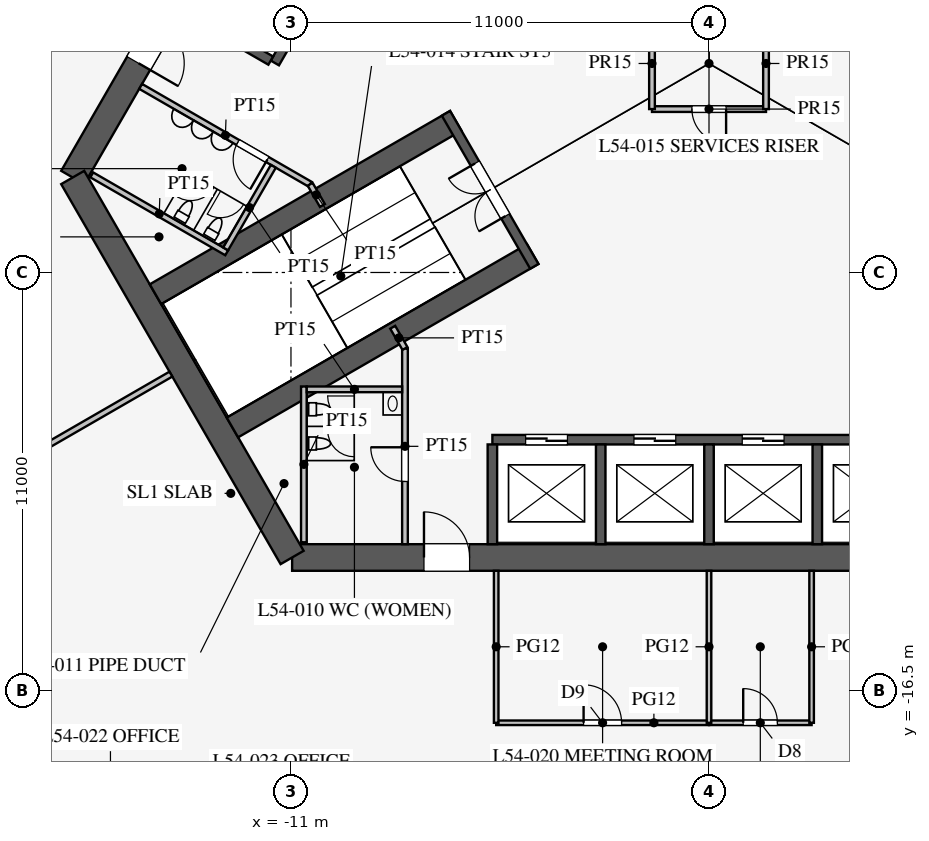
"""IFC4 building model, lengths in metres.
Left out: names, types, materials, properties, quantities, classifications, styles, units other than length and angle.
Written with IfcOpenShell. Run it as: python <this file> out.ifc"""

import sys

from ifc_helpers import new_model, si_unit, direction, frame, frame_2d, origin, place, context, subcontext, project, spatial, rectangle, extrude, element, fill, save


model = new_model("IFC4")
c1 = context("Model", 3, precision=1e-05, world=origin(), true_north=direction((0.0, 1.0)))
c2 = subcontext(c1, "Body", "Model", "MODEL_VIEW")
j1 = project(units=[si_unit("LENGTHUNIT", "METRE"), si_unit("PLANEANGLEUNIT", "RADIAN")], contexts=[c1])
p1 = place(None, origin())
s1 = spatial("IfcSite", under=j1, at=p1, CompositionType="ELEMENT")
p2 = place(p1, origin())
s2 = spatial("IfcBuilding", under=s1, at=p2, CompositionType="ELEMENT")
p3 = place(p2, frame((0.0, 0.0, 235.9)))
s3 = spatial("IfcBuildingStorey", under=s2, at=p3, CompositionType="ELEMENT", Elevation=235.9)
p4 = place(p3, frame((-10.97, -13.0, 0.0), z_axis=(0.0, 0.0, 1.0), x_axis=(1.0, 0.0, 0.0)))
e1 = element("IfcWall", 1, at=p4, inside=s3, PredefinedType="SHEAR", context=c2, shape_type="SweptSolid", body=[
    extrude(rectangle(XDim=21.939, YDim=0.7, at=frame_2d((10.97, 0.0))), origin(), (0.0, 0.0, 1.0), 4.2),
])
p5 = place(p4, frame((17.27, 0.0, 0.0)))
e2 = element("IfcOpeningElement", 2, at=p5, cuts=e1, PredefinedType="OPENING", context=c2, shape_type="SweptSolid", body=[
    extrude(rectangle(XDim=1.2, YDim=2.1, at=frame_2d((0.6, 1.05))), frame((0.0, 0.36, 0.0), z_axis=(0.0, -1.0, 0.0), x_axis=(1.0, 0.0, 0.0)), (0.0, 0.0, 1.0), 0.72),
])
p6 = place(p4, frame((3.47, 0.0, 0.0)))
e3 = element("IfcOpeningElement", 3, at=p6, cuts=e1, PredefinedType="OPENING", context=c2, shape_type="SweptSolid", body=[
    extrude(rectangle(XDim=1.2, YDim=2.1, at=frame_2d((0.6, 1.05))), frame((0.0, 0.36, 0.0), z_axis=(0.0, -1.0, 0.0), x_axis=(1.0, 0.0, 0.0)), (0.0, 0.0, 1.0), 0.72),
])
p7 = place(p3, frame((-5.773, 16.0, 0.0), z_axis=(0.0, 0.0, 1.0), x_axis=(-0.500002442456, -0.866023993627, 0.0)))
e4 = element("IfcWall", 4, at=p7, inside=s3, PredefinedType="SHEAR", context=c2, shape_type="SweptSolid", body=[
    extrude(rectangle(XDim=21.939, YDim=0.7, at=frame_2d((10.97, 0.0))), origin(), (0.0, 0.0, 1.0), 4.2),
])
p8 = place(p7, frame((17.27, 0.0, 0.0)))
e5 = element("IfcOpeningElement", 5, at=p8, cuts=e4, PredefinedType="OPENING", context=c2, shape_type="SweptSolid", body=[
    extrude(rectangle(XDim=1.2, YDim=2.1, at=frame_2d((0.6, 1.05))), frame((0.0, 0.36, 0.0), z_axis=(0.0, -1.0, 0.0), x_axis=(1.0, 0.0, 0.0)), (0.0, 0.0, 1.0), 0.72),
])
p9 = place(p7, frame((3.47, 0.0, 0.0)))
e6 = element("IfcOpeningElement", 6, at=p9, cuts=e4, PredefinedType="OPENING", context=c2, shape_type="SweptSolid", body=[
    extrude(rectangle(XDim=1.2, YDim=2.1, at=frame_2d((0.6, 1.05))), frame((0.0, 0.36, 0.0), z_axis=(0.0, -1.0, 0.0), x_axis=(1.0, 0.0, 0.0)), (0.0, 0.0, 1.0), 0.72),
])
p10 = place(p3, frame((-16.743, -3.0, 0.0), z_axis=(0.0, 0.0, 1.0), x_axis=(0.499995765644, -0.866027848477, 0.0)))
e7 = element("IfcWall", 7, at=p10, inside=s3, PredefinedType="SHEAR", context=c2, shape_type="SweptSolid", body=[
    extrude(rectangle(XDim=11.547, YDim=0.7, at=frame_2d((5.773, 0.0))), origin(), (0.0, 0.0, 1.0), 4.2),
])
p11 = place(p3, frame((-5.7, -9.9, 0.0), z_axis=(0.0, 0.0, 1.0), x_axis=(1.0, 0.0, 0.0)))
e8 = element("IfcWall", 8, at=p11, inside=s3, PredefinedType="SHEAR", context=c2, shape_type="SweptSolid", body=[
    extrude(rectangle(XDim=11.4, YDim=0.25, at=frame_2d((5.7, 0.0))), origin(), (0.0, 0.0, 1.0), 4.2),
])
p12 = place(p11, frame((0.875, 0.0, 0.0)))
e9 = element("IfcOpeningElement", 9, at=p12, cuts=e8, PredefinedType="OPENING", context=c2, shape_type="SweptSolid", body=[
    extrude(rectangle(XDim=1.1, YDim=2.2, at=frame_2d((0.55, 1.1))), frame((0.0, 0.135, 0.0), z_axis=(0.0, -1.0, 0.0), x_axis=(1.0, 0.0, 0.0)), (0.0, 0.0, 1.0), 0.27),
])
p13 = place(p11, frame((3.725, 0.0, 0.0)))
e10 = element("IfcOpeningElement", 10, at=p13, cuts=e8, PredefinedType="OPENING", context=c2, shape_type="SweptSolid", body=[
    extrude(rectangle(XDim=1.1, YDim=2.2, at=frame_2d((0.55, 1.1))), frame((0.0, 0.135, 0.0), z_axis=(0.0, -1.0, 0.0), x_axis=(1.0, 0.0, 0.0)), (0.0, 0.0, 1.0), 0.27),
])
p14 = place(p11, frame((6.575, 0.0, 0.0)))
e11 = element("IfcOpeningElement", 11, at=p14, cuts=e8, PredefinedType="OPENING", context=c2, shape_type="SweptSolid", body=[
    extrude(rectangle(XDim=1.1, YDim=2.2, at=frame_2d((0.55, 1.1))), frame((0.0, 0.135, 0.0), z_axis=(0.0, -1.0, 0.0), x_axis=(1.0, 0.0, 0.0)), (0.0, 0.0, 1.0), 0.27),
])
p15 = place(p11, frame((9.425, 0.0, 0.0)))
e12 = element("IfcOpeningElement", 12, at=p15, cuts=e8, PredefinedType="OPENING", context=c2, shape_type="SweptSolid", body=[
    extrude(rectangle(XDim=1.1, YDim=2.2, at=frame_2d((0.55, 1.1))), frame((0.0, 0.135, 0.0), z_axis=(0.0, -1.0, 0.0), x_axis=(1.0, 0.0, 0.0)), (0.0, 0.0, 1.0), 0.27),
])
for number, where, z_axis, x_axis in (
    (13, (-5.7, -10.025, 0.0), (0.0, 0.0, 1.0), (0.0, -1.0, 0.0)),
    (14, (-2.85, -10.025, 0.0), (0.0, 0.0, 1.0), (0.0, -1.0, 0.0)),
    (15, (0.0, -10.025, 0.0), (0.0, 0.0, 1.0), (0.0, -1.0, 0.0)),
    (16, (2.85, -10.025, 0.0), (0.0, 0.0, 1.0), (0.0, -1.0, 0.0)),
):
    element("IfcWall", number, at=place(p3, frame(where, z_axis=z_axis, x_axis=x_axis)), inside=s3, PredefinedType="SHEAR", context=c2, shape_type="SweptSolid", body=[
        extrude(rectangle(XDim=2.625, YDim=0.25, at=frame_2d((1.312, 0.0))), origin(), (0.0, 0.0, 1.0), 4.2),
    ])
p16 = place(p3, frame((-5.724, 9.886, 0.0), z_axis=(0.0, 0.0, 1.0), x_axis=(-0.500001763848, -0.866024385424, 0.0)))
e17 = element("IfcWall", 17, at=p16, inside=s3, PredefinedType="SHEAR", context=c2, shape_type="SweptSolid", body=[
    extrude(rectangle(XDim=11.4, YDim=0.25, at=frame_2d((5.7, 0.0))), origin(), (0.0, 0.0, 1.0), 4.2),
])
p17 = place(p16, frame((6.525, 0.0, 0.0)))
e18 = element("IfcOpeningElement", 18, at=p17, cuts=e17, PredefinedType="OPENING", context=c2, shape_type="SweptSolid", body=[
    extrude(rectangle(XDim=1.2, YDim=2.2, at=frame_2d((0.6, 1.1))), frame((0.0, 0.135, 0.0), z_axis=(0.0, -1.0, 0.0), x_axis=(1.0, 0.0, 0.0)), (0.0, 0.0, 1.0), 0.27),
])
p18 = place(p16, frame((9.375, 0.0, 0.0)))
e19 = element("IfcOpeningElement", 19, at=p18, cuts=e17, PredefinedType="OPENING", context=c2, shape_type="SweptSolid", body=[
    extrude(rectangle(XDim=1.2, YDim=2.2, at=frame_2d((0.6, 1.1))), frame((0.0, 0.135, 0.0), z_axis=(0.0, -1.0, 0.0), x_axis=(1.0, 0.0, 0.0)), (0.0, 0.0, 1.0), 0.27),
])
p19 = place(p3, frame((-11.532, 0.076, 0.0), z_axis=(0.0, 0.0, 1.0), x_axis=(-0.866013657776, 0.500020344131, 0.0)))
e20 = element("IfcWall", 20, at=p19, inside=s3, PredefinedType="SHEAR", context=c2, shape_type="SweptSolid", body=[
    extrude(rectangle(XDim=2.625, YDim=0.25, at=frame_2d((1.312, 0.0))), origin(), (0.0, 0.0, 1.0), 4.2),
])
for number, where, z_axis, x_axis in (
    (21, (-6.663, -1.509, 0.0), (0.0, 0.0, 1.0), (-0.866, -0.5, 0.0)),
    (22, (-4.638, -5.016, 0.0), (0.0, 0.0, 1.0), (-0.866, -0.5, 0.0)),
):
    element("IfcWall", number, at=place(p3, frame(where, z_axis=z_axis, x_axis=x_axis)), inside=s3, PredefinedType="SHEAR", context=c2, shape_type="SweptSolid", body=[
        extrude(rectangle(XDim=9.125, YDim=0.6, at=frame_2d((4.562, 0.0))), origin(), (0.0, 0.0, 1.0), 4.2),
    ])
p20 = place(p3, frame((-6.922, -1.312, 0.0), z_axis=(0.0, 0.0, 1.0), x_axis=(0.499984536904, -0.866034331223, 0.0)))
e23 = element("IfcWall", 23, at=p20, inside=s3, PredefinedType="SHEAR", context=c2, shape_type="SweptSolid", body=[
    extrude(rectangle(XDim=4.65, YDim=0.25, at=frame_2d((2.325, 0.0))), origin(), (0.0, 0.0, 1.0), 4.2),
])
p21 = place(p20, frame((1.525, 0.0, 0.0)))
e24 = element("IfcOpeningElement", 24, at=p21, cuts=e23, PredefinedType="OPENING", context=c2, shape_type="SweptSolid", body=[
    extrude(rectangle(XDim=1.6, YDim=2.1, at=frame_2d((0.8, 1.05))), frame((0.0, 0.135, 0.0), z_axis=(0.0, -1.0, 0.0), x_axis=(1.0, 0.0, 0.0)), (0.0, 0.0, 1.0), 0.27),
])
p22 = place(p3, frame((-8.0, -7.5, 0.0), z_axis=(0.0, 0.0, 1.0), x_axis=(0.0, -1.0, 0.0)))
e25 = element("IfcWall", 25, at=p22, inside=s3, PredefinedType="PARTITIONING", context=c2, shape_type="SweptSolid", body=[
    extrude(rectangle(XDim=5.15, YDim=0.15, at=frame_2d((2.575, 0.0))), origin(), (0.0, 0.0, 1.0), 4.0),
])
p23 = place(p22, frame((2.6, 0.0, 0.0)))
e26 = element("IfcOpeningElement", 26, at=p23, cuts=e25, PredefinedType="OPENING", context=c2, shape_type="SweptSolid", body=[
    extrude(rectangle(XDim=0.9, YDim=2.1, at=frame_2d((0.45, 1.05))), frame((0.0, 0.085, 0.0), z_axis=(0.0, -1.0, 0.0), x_axis=(1.0, 0.0, 0.0)), (0.0, 0.0, 1.0), 0.17),
])
p24 = place(p3, frame((-10.495, -3.178, 0.0), z_axis=(0.0, 0.0, 1.0), x_axis=(-0.866037967349, 0.499978238636, 0.0)))
e27 = element("IfcWall", 27, at=p24, inside=s3, PredefinedType="PARTITIONING", context=c2, shape_type="SweptSolid", body=[
    extrude(rectangle(XDim=5.15, YDim=0.15, at=frame_2d((2.575, 0.0))), origin(), (0.0, 0.0, 1.0), 4.0),
])
p25 = place(p24, frame((1.3, 0.0, 0.0)))
e28 = element("IfcOpeningElement", 28, at=p25, cuts=e27, PredefinedType="OPENING", context=c2, shape_type="SweptSolid", body=[
    extrude(rectangle(XDim=0.9, YDim=2.1, at=frame_2d((0.45, 1.05))), frame((0.0, 0.085, 0.0), z_axis=(0.0, -1.0, 0.0), x_axis=(1.0, 0.0, 0.0)), (0.0, 0.0, 1.0), 0.17),
])
for number, where, z_axis, x_axis in (
    (29, (-10.495, -3.178, 0.0), (0.0, 0.0, 1.0), (0.5, -0.866, 0.0)),
    (30, (-8.0, -7.5, 0.0), (0.0, 0.0, 1.0), (-0.5, 0.866, 0.0)),
):
    element("IfcWall", number, at=place(p3, frame(where, z_axis=z_axis, x_axis=x_axis)), inside=s3, PredefinedType="PARTITIONING", context=c2, shape_type="SweptSolid", body=[
        extrude(rectangle(XDim=0.645, YDim=0.15, at=frame_2d((0.323, 0.0))), origin(), (0.0, 0.0, 1.0), 4.0),
    ])
p26 = place(p3, frame((-12.691, -4.982, 0.0), z_axis=(0.0, 0.0, 1.0), x_axis=(-0.8660249478, 0.500000789788, 0.0)))
e31 = element("IfcWall", 31, at=p26, inside=s3, PredefinedType="PARTITIONING", context=c2, shape_type="SweptSolid", body=[
    extrude(rectangle(XDim=4.1, YDim=0.15, at=frame_2d((2.05, 0.0))), origin(), (0.0, 0.0, 1.0), 4.0),
])
p27 = place(p3, frame((-11.464, -2.706, 0.0), z_axis=(0.0, 0.0, 1.0), x_axis=(-0.50001992892, -0.866013897511, 0.0)))
e32 = element("IfcWall", 32, at=p27, inside=s3, PredefinedType="PARTITIONING", context=c2, shape_type="SweptSolid", body=[
    extrude(rectangle(XDim=2.51, YDim=0.15, at=frame_2d((1.255, 0.0))), origin(), (0.0, 0.0, 1.0), 4.0),
])
p28 = place(p3, frame((-10.66, -8.5, 0.0), z_axis=(0.0, 0.0, 1.0), x_axis=(0.0, -1.0, 0.0)))
e33 = element("IfcWall", 33, at=p28, inside=s3, PredefinedType="PARTITIONING", context=c2, shape_type="SweptSolid", body=[
    extrude(rectangle(XDim=4.1, YDim=0.15, at=frame_2d((2.05, 0.0))), origin(), (0.0, 0.0, 1.0), 4.0),
])
p29 = place(p3, frame((-8.075, -8.575, 0.0), z_axis=(0.0, 0.0, 1.0), x_axis=(-1.0, 0.0, 0.0)))
e34 = element("IfcWall", 34, at=p29, inside=s3, PredefinedType="PARTITIONING", context=c2, shape_type="SweptSolid", body=[
    extrude(rectangle(XDim=2.51, YDim=0.15, at=frame_2d((1.255, 0.0))), origin(), (0.0, 0.0, 1.0), 4.0),
])
p30 = place(p3, frame((-1.5, -1.2, 0.0), z_axis=(0.0, 0.0, 1.0), x_axis=(1.0, 0.0, 0.0)))
e35 = element("IfcWall", 35, at=p30, inside=s3, PredefinedType="PARTITIONING", context=c2, shape_type="SweptSolid", body=[
    extrude(rectangle(XDim=3.0, YDim=0.15, at=frame_2d((1.5, 0.0))), origin(), (0.0, 0.0, 1.0), 4.0),
])
p31 = place(p30, frame((1.05, 0.0, 0.0)))
e36 = element("IfcOpeningElement", 36, at=p31, cuts=e35, PredefinedType="OPENING", context=c2, shape_type="SweptSolid", body=[
    extrude(rectangle(XDim=0.9, YDim=2.1, at=frame_2d((0.45, 1.05))), frame((0.0, 0.085, 0.0), z_axis=(0.0, -1.0, 0.0), x_axis=(1.0, 0.0, 0.0)), (0.0, 0.0, 1.0), 0.17),
])
for number, where, z_axis, x_axis in (
    (37, (1.5, -1.2, 0.0), (0.0, 0.0, 1.0), (0.0, 1.0, 0.0)),
    (38, (-1.5, 1.2, 0.0), (0.0, 0.0, 1.0), (0.0, -1.0, 0.0)),
):
    element("IfcWall", number, at=place(p3, frame(where, z_axis=z_axis, x_axis=x_axis)), inside=s3, PredefinedType="PARTITIONING", context=c2, shape_type="SweptSolid", body=[
        extrude(rectangle(XDim=2.4, YDim=0.15, at=frame_2d((1.2, 0.0))), origin(), (0.0, 0.0, 1.0), 4.0),
    ])
p32 = place(p3, frame((-14.159, -8.175, 0.0), z_axis=(0.0, 0.0, 1.0), x_axis=(-0.866027028085, -0.499997186618, 0.0)))
e39 = element("IfcWall", 39, at=p32, inside=s3, PredefinedType="PARTITIONING", context=c2, shape_type="SweptSolid", body=[
    extrude(rectangle(XDim=15.0, YDim=0.15, at=frame_2d((7.5, 0.0))), origin(), (0.0, 0.0, 1.0), 2.4),
])
p33 = place(p3, frame((0.0, -17.35, 0.0), z_axis=(0.0, 0.0, 1.0), x_axis=(1.0, 0.0, 0.0)))
e40 = element("IfcWall", 40, at=p33, inside=s3, PredefinedType="PARTITIONING", context=c2, shape_type="SweptSolid", body=[
    extrude(rectangle(XDim=2.7, YDim=0.12, at=frame_2d((1.35, 0.0))), origin(), (0.0, 0.0, 1.0), 2.9),
])
p34 = place(p33, frame((0.9, 0.0, 0.15)))
e41 = element("IfcOpeningElement", 41, at=p34, cuts=e40, PredefinedType="OPENING", context=c2, shape_type="SweptSolid", body=[
    extrude(rectangle(XDim=0.9, YDim=2.1, at=frame_2d((0.45, 1.05))), frame((0.0, 0.07, 0.0), z_axis=(0.0, -1.0, 0.0), x_axis=(1.0, 0.0, 0.0)), (0.0, 0.0, 1.0), 0.14),
])
p35 = place(p3, frame((-5.6, -17.35, 0.0), z_axis=(0.0, 0.0, 1.0), x_axis=(1.0, 0.0, 0.0)))
e42 = element("IfcWall", 42, at=p35, inside=s3, PredefinedType="PARTITIONING", context=c2, shape_type="SweptSolid", body=[
    extrude(rectangle(XDim=5.6, YDim=0.12, at=frame_2d((2.8, 0.0))), origin(), (0.0, 0.0, 1.0), 2.9),
])
p36 = place(p35, frame((2.3, 0.0, 0.15)))
e43 = element("IfcOpeningElement", 43, at=p36, cuts=e42, PredefinedType="OPENING", context=c2, shape_type="SweptSolid", body=[
    extrude(rectangle(XDim=1.0, YDim=2.1, at=frame_2d((0.5, 1.05))), frame((0.0, 0.07, 0.0), z_axis=(0.0, -1.0, 0.0), x_axis=(1.0, 0.0, 0.0)), (0.0, 0.0, 1.0), 0.14),
])
for number, where, z_axis, x_axis in (
    (44, (2.7, -13.35, 0.0), (0.0, 0.0, 1.0), (0.0, -1.0, 0.0)),
    (45, (0.0, -13.35, 0.0), (0.0, 0.0, 1.0), (0.0, -1.0, 0.0)),
    (46, (-5.6, -13.35, 0.0), (0.0, 0.0, 1.0), (0.0, -1.0, 0.0)),
):
    element("IfcWall", number, at=place(p3, frame(where, z_axis=z_axis, x_axis=x_axis)), inside=s3, PredefinedType="PARTITIONING", context=c2, shape_type="SweptSolid", body=[
        extrude(rectangle(XDim=4.0, YDim=0.12, at=frame_2d((2.0, 0.0))), origin(), (0.0, 0.0, 1.0), 2.9),
    ])
p37 = place(p23, frame((0.9, 0.0, 0.0), z_axis=(0.0, 0.0, 1.0), x_axis=(-1.0, 0.0, 0.0)))
e47 = element("IfcDoor", 47, at=p37, inside=s3, OperationType="SINGLE_SWING_RIGHT", PredefinedType="DOOR", context=c2, shape_type="SweptSolid", body=[
    extrude(rectangle(XDim=0.9, YDim=2.1, at=frame_2d((0.45, 1.05))), frame((0.0, 0.025, 0.0), z_axis=(0.0, -1.0, 0.0), x_axis=(1.0, 0.0, 0.0)), (0.0, 0.0, 1.0), 0.05),
])
fill(e26, e47)
p38 = place(p25, origin())
e48 = element("IfcDoor", 48, at=p38, inside=s3, OperationType="SINGLE_SWING_LEFT", PredefinedType="DOOR", context=c2, shape_type="SweptSolid", body=[
    extrude(rectangle(XDim=0.9, YDim=2.1, at=frame_2d((0.45, 1.05))), frame((0.0, 0.025, 0.0), z_axis=(0.0, -1.0, 0.0), x_axis=(1.0, 0.0, 0.0)), (0.0, 0.0, 1.0), 0.05),
])
fill(e28, e48)
p39 = place(p31, frame((0.9, 0.0, 0.0), z_axis=(0.0, 0.0, 1.0), x_axis=(-1.0, 0.0, 0.0)))
e49 = element("IfcDoor", 49, at=p39, inside=s3, OperationType="SINGLE_SWING_LEFT", PredefinedType="DOOR", context=c2, shape_type="SweptSolid", body=[
    extrude(rectangle(XDim=0.9, YDim=2.1, at=frame_2d((0.45, 1.05))), frame((0.0, 0.025, 0.0), z_axis=(0.0, -1.0, 0.0), x_axis=(1.0, 0.0, 0.0)), (0.0, 0.0, 1.0), 0.05),
])
fill(e36, e49)
p40 = place(p21, frame((1.6, 0.0, 0.0), z_axis=(0.0, 0.0, 1.0), x_axis=(-1.0, 0.0, 0.0)))
e50 = element("IfcDoor", 50, at=p40, inside=s3, OperationType="DOUBLE_DOOR_SINGLE_SWING", PredefinedType="DOOR", context=c2, shape_type="SweptSolid", body=[
    extrude(rectangle(XDim=1.6, YDim=2.1, at=frame_2d((0.8, 1.05))), frame((0.0, 0.025, 0.0), z_axis=(0.0, -1.0, 0.0), x_axis=(1.0, 0.0, 0.0)), (0.0, 0.0, 1.0), 0.05),
])
fill(e24, e50)
p41 = place(p6, origin())
e51 = element("IfcDoor", 51, at=p41, inside=s3, OperationType="SINGLE_SWING_LEFT", PredefinedType="DOOR", context=c2, shape_type="SweptSolid", body=[
    extrude(rectangle(XDim=1.2, YDim=2.1, at=frame_2d((0.6, 1.05))), frame((0.0, 0.025, 0.0), z_axis=(0.0, -1.0, 0.0), x_axis=(1.0, 0.0, 0.0)), (0.0, 0.0, 1.0), 0.05),
])
fill(e3, e51)
p42 = place(p8, origin())
e52 = element("IfcDoor", 52, at=p42, inside=s3, OperationType="SINGLE_SWING_RIGHT", PredefinedType="DOOR", context=c2, shape_type="SweptSolid", body=[
    extrude(rectangle(XDim=1.2, YDim=2.1, at=frame_2d((0.6, 1.05))), frame((0.0, 0.025, 0.0), z_axis=(0.0, -1.0, 0.0), x_axis=(1.0, 0.0, 0.0)), (0.0, 0.0, 1.0), 0.05),
])
fill(e5, e52)
p43 = place(p36, origin())
e53 = element("IfcDoor", 53, at=p43, inside=s3, OperationType="SINGLE_SWING_LEFT", PredefinedType="DOOR", context=c2, shape_type="SweptSolid", body=[
    extrude(rectangle(XDim=1.0, YDim=2.1, at=frame_2d((0.5, 1.05))), frame((0.0, 0.025, 0.0), z_axis=(0.0, -1.0, 0.0), x_axis=(1.0, 0.0, 0.0)), (0.0, 0.0, 1.0), 0.05),
])
fill(e43, e53)
p44 = place(p34, origin())
e54 = element("IfcDoor", 54, at=p44, inside=s3, OperationType="SINGLE_SWING_LEFT", PredefinedType="DOOR", context=c2, shape_type="SweptSolid", body=[
    extrude(rectangle(XDim=0.9, YDim=2.1, at=frame_2d((0.45, 1.05))), frame((0.0, 0.025, 0.0), z_axis=(0.0, -1.0, 0.0), x_axis=(1.0, 0.0, 0.0)), (0.0, 0.0, 1.0), 0.05),
])
fill(e41, e54)
p45 = place(p12, origin())
e55 = element("IfcDoor", 55, at=p45, inside=s3, OperationType="DOUBLE_DOOR_SLIDING", PredefinedType="DOOR", context=c2, shape_type="SweptSolid", body=[
    extrude(rectangle(XDim=1.1, YDim=2.2, at=frame_2d((0.55, 1.1))), frame((0.0, 0.025, 0.0), z_axis=(0.0, -1.0, 0.0), x_axis=(1.0, 0.0, 0.0)), (0.0, 0.0, 1.0), 0.05),
])
fill(e9, e55)
p46 = place(p13, origin())
e56 = element("IfcDoor", 56, at=p46, inside=s3, OperationType="DOUBLE_DOOR_SLIDING", PredefinedType="DOOR", context=c2, shape_type="SweptSolid", body=[
    extrude(rectangle(XDim=1.1, YDim=2.2, at=frame_2d((0.55, 1.1))), frame((0.0, 0.025, 0.0), z_axis=(0.0, -1.0, 0.0), x_axis=(1.0, 0.0, 0.0)), (0.0, 0.0, 1.0), 0.05),
])
fill(e10, e56)
p47 = place(p14, origin())
e57 = element("IfcDoor", 57, at=p47, inside=s3, OperationType="DOUBLE_DOOR_SLIDING", PredefinedType="DOOR", context=c2, shape_type="SweptSolid", body=[
    extrude(rectangle(XDim=1.1, YDim=2.2, at=frame_2d((0.55, 1.1))), frame((0.0, 0.025, 0.0), z_axis=(0.0, -1.0, 0.0), x_axis=(1.0, 0.0, 0.0)), (0.0, 0.0, 1.0), 0.05),
])
fill(e11, e57)
save(model, sys.argv[1])
